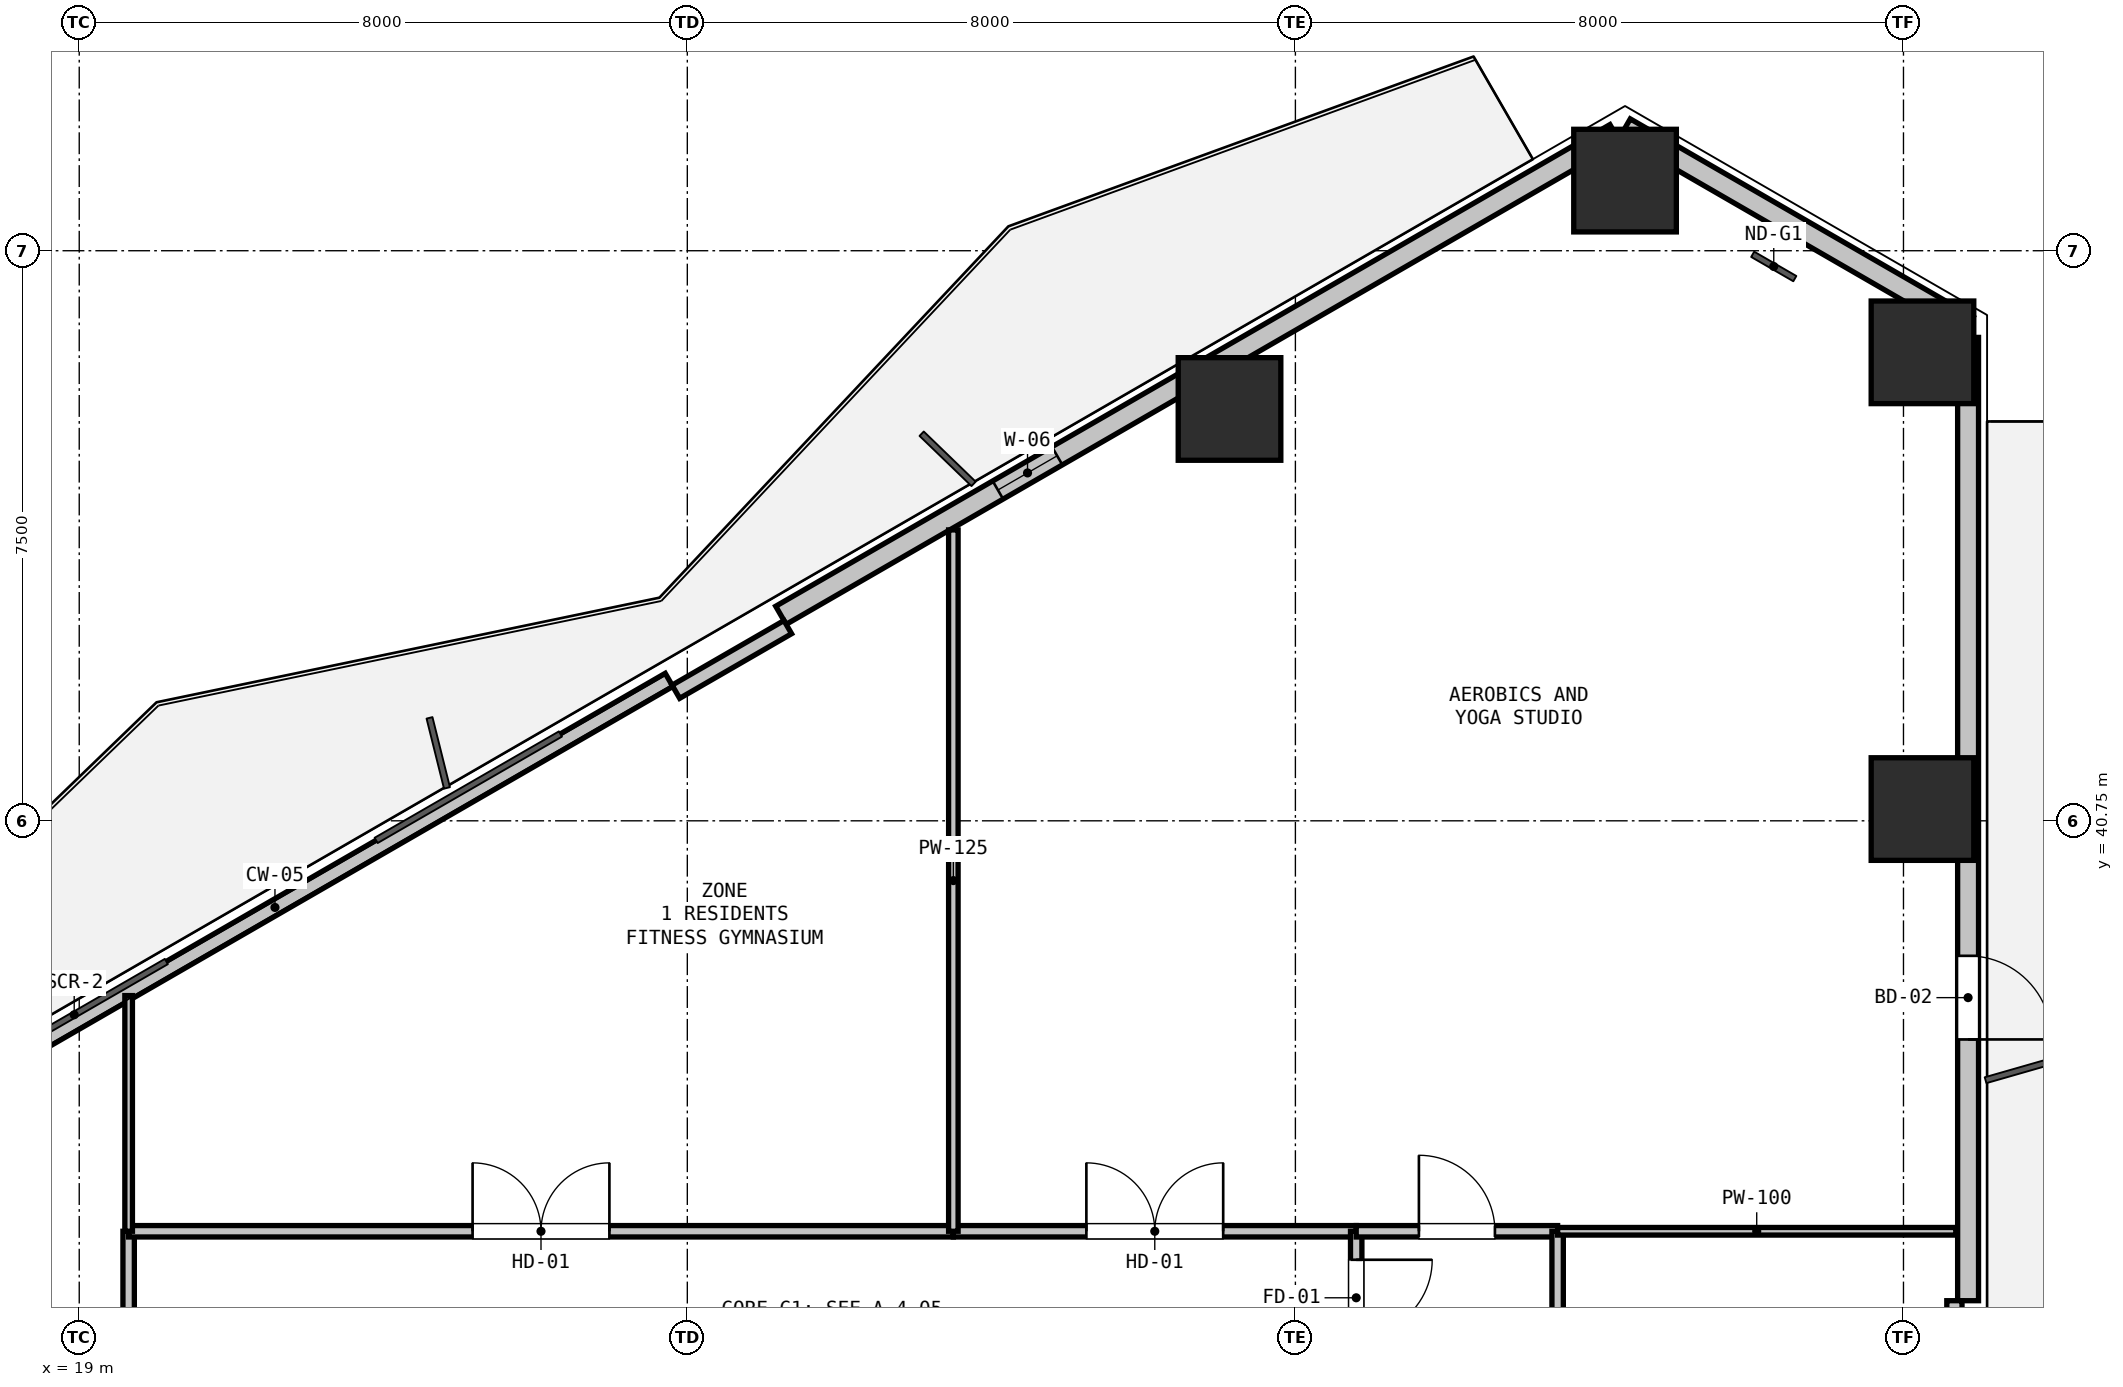
"""IFC4 building model, lengths in metres.
Left out: names, types, materials, properties, quantities, classifications, styles, units other than length and angle.
Written with IfcOpenShell. Run it as: python <this file> out.ifc"""

import sys

from ifc_helpers import new_model, si_unit, direction, frame, frame_2d, origin, origin_2d, place, context, subcontext, project, spatial, rectangle, hollow_rectangle, extrude, element, fill, save


model = new_model("IFC4")
c1 = context("Model", 3, precision=1e-05, world=origin(), true_north=direction((0.0, 1.0)))
c2 = subcontext(c1, "Body", "Model", "MODEL_VIEW")
j1 = project(units=[si_unit("LENGTHUNIT", "METRE"), si_unit("PLANEANGLEUNIT", "RADIAN")], contexts=[c1])
p1 = place(None, origin())
s1 = spatial("IfcSite", under=j1, at=p1, CompositionType="ELEMENT")
p2 = place(p1, origin())
s2 = spatial("IfcBuilding", under=s1, at=p2, CompositionType="ELEMENT")
p3 = place(p2, frame((0.0, 0.0, 62.1)))
s3 = spatial("IfcBuildingStorey", under=s2, at=p3, CompositionType="ELEMENT", Elevation=62.1)
p4 = place(p3, frame((34.133, 46.168, 0.0), z_axis=(0.0, 0.0, 1.0), x_axis=(1.0, 0.0, 0.0)))
e1 = element("IfcColumn", 1, at=p4, inside=s3, PredefinedType="COLUMN", context=c2, shape_type="SweptSolid", body=[
    extrude(hollow_rectangle(XDim=1.35, YDim=1.35, WallThickness=0.036, at=origin_2d()), origin(), (0.0, 0.0, 1.0), 3.13),
])
for number, where, z_axis, x_axis in (
    (2, (39.337, 49.173, 0.0), (0.0, 0.0, 1.0), (1.0, 0.0, 0.0)),
    (3, (43.25, 46.913, 0.0), (0.0, 0.0, 1.0), (1.0, 0.0, 0.0)),
):
    element("IfcColumn", number, at=place(p3, frame(where, z_axis=z_axis, x_axis=x_axis)), inside=s3, PredefinedType="COLUMN", context=c2, shape_type="SweptSolid", body=[
        extrude(hollow_rectangle(XDim=1.35, YDim=1.35, WallThickness=0.036, at=origin_2d()), origin(), (0.0, 0.0, 1.0), 2.88),
    ])
p5 = place(p3, frame((43.25, 40.905, 0.0), z_axis=(0.0, 0.0, 1.0), x_axis=(1.0, 0.0, 0.0)))
e4 = element("IfcColumn", 4, at=p5, inside=s3, PredefinedType="COLUMN", context=c2, shape_type="SweptSolid", body=[
    extrude(hollow_rectangle(XDim=1.35, YDim=1.35, WallThickness=0.036, at=origin_2d()), origin(), (0.0, 0.0, 1.0), 3.13),
])
p6 = place(p3, frame((39.337, 49.865, 0.0), z_axis=(0.0, 0.0, 1.0), x_axis=(0.866043601342, -0.499968479581, 0.0)))
e5 = element("IfcWall", 5, at=p6, inside=s3, PredefinedType="SOLIDWALL", context=c2, shape_type="SweptSolid", body=[
    extrude(rectangle(XDim=5.211, YDim=0.275, at=frame_2d((2.605, 0.0))), origin(), (0.0, 0.0, 1.0), 4.1),
])
p7 = place(p3, frame((16.39, 36.617, 0.0), z_axis=(0.0, 0.0, 1.0), x_axis=(0.866027351828, 0.499996625875, 0.0)))
e6 = element("IfcWall", 6, at=p7, inside=s3, PredefinedType="PARAPET", context=c2, shape_type="SweptSolid", body=[
    extrude(rectangle(XDim=11.973, YDim=0.2, at=frame_2d((5.987, 0.0))), origin(), (0.0, 0.0, 1.0), 0.2),
])
p8 = place(p3, frame((28.232, 43.454, 0.0), z_axis=(0.0, 0.0, 1.0), x_axis=(0.86603192154, 0.499988710747, 0.0)))
e7 = element("IfcWall", 7, at=p8, inside=s3, PredefinedType="SOLIDWALL", context=c2, shape_type="SweptSolid", body=[
    extrude(rectangle(XDim=12.673, YDim=0.275, at=frame_2d((6.336, 0.0))), origin(), (0.0, 0.0, 1.0), 2.865),
])
p9 = place(p8, frame((3.296, 0.0, 0.9)))
e8 = element("IfcOpeningElement", 8, at=p9, cuts=e7, PredefinedType="OPENING", context=c2, shape_type="SweptSolid", body=[
    extrude(rectangle(XDim=0.9, YDim=1.4, at=frame_2d((0.45, 0.7))), frame((0.0, 0.147, 0.0), z_axis=(0.0, -1.0, 0.0), x_axis=(1.0, 0.0, 0.0)), (0.0, 0.0, 1.0), 0.295),
])
p10 = place(p3, frame((26.85, 42.448, 0.0), z_axis=(0.0, 0.0, 1.0), x_axis=(0.86605165483, 0.499954529098, 0.0)))
e9 = element("IfcWall", 9, at=p10, inside=s3, PredefinedType="PARAPET", context=c2, shape_type="SweptSolid", body=[
    extrude(rectangle(XDim=1.7, YDim=0.2, at=frame_2d((0.85, 0.0))), origin(), (0.0, 0.0, 1.0), 4.1),
])
p11 = place(p3, frame((43.85, 47.11, 0.0), z_axis=(0.0, 0.0, 1.0), x_axis=(0.0, -1.0, 0.0)))
e10 = element("IfcWall", 10, at=p11, inside=s3, PredefinedType="SOLIDWALL", context=c2, shape_type="SweptSolid", body=[
    extrude(rectangle(XDim=12.673, YDim=0.275, at=frame_2d((6.336, 0.0))), origin(), (0.0, 0.0, 1.0), 2.865),
])
p12 = place(p11, frame((8.136, 0.0, 0.0)))
e11 = element("IfcOpeningElement", 11, at=p12, cuts=e10, PredefinedType="OPENING", context=c2, shape_type="SweptSolid", body=[
    extrude(rectangle(XDim=1.1, YDim=2.1, at=frame_2d((0.55, 1.05))), frame((0.0, 0.147, 0.0), z_axis=(0.0, -1.0, 0.0), x_axis=(1.0, 0.0, 0.0)), (0.0, 0.0, 1.0), 0.295),
])
p13 = place(p3, frame((43.67, 34.437, 0.0), z_axis=(0.0, 0.0, 1.0), x_axis=(0.0, -1.0, 0.0)))
e12 = element("IfcWall", 12, at=p13, inside=s3, PredefinedType="PARAPET", context=c2, shape_type="SweptSolid", body=[
    extrude(rectangle(XDim=1.7, YDim=0.2, at=frame_2d((0.85, 0.0))), origin(), (0.0, 0.0, 1.0), 4.1),
])
p14 = place(p3, frame((19.65, 28.5, 0.0), z_axis=(0.0, 0.0, 1.0), x_axis=(0.0, 1.0, 0.0)))
e13 = element("IfcWall", 13, at=p14, inside=s3, PredefinedType="PARTITIONING", context=c2, shape_type="SweptSolid", body=[
    extrude(rectangle(XDim=6.85, YDim=0.15, at=frame_2d((3.425, 0.0))), origin(), (0.0, 0.0, 1.0), 4.48),
])
p15 = place(p14, frame((2.925, 0.0, 0.0)))
e14 = element("IfcOpeningElement", 14, at=p15, cuts=e13, PredefinedType="OPENING", context=c2, shape_type="SweptSolid", body=[
    extrude(rectangle(XDim=1.0, YDim=2.15, at=frame_2d((0.5, 1.075))), frame((0.0, 0.085, 0.0), z_axis=(0.0, -1.0, 0.0), x_axis=(1.0, 0.0, 0.0)), (0.0, 0.0, 1.0), 0.17),
])
p16 = place(p3, frame((19.65, 35.35, 0.0), z_axis=(0.0, 0.0, 1.0), x_axis=(1.0, 0.0, 0.0)))
e15 = element("IfcWall", 15, at=p16, inside=s3, PredefinedType="PARTITIONING", context=c2, shape_type="SweptSolid", body=[
    extrude(rectangle(XDim=10.85, YDim=0.15, at=frame_2d((5.425, 0.0))), origin(), (0.0, 0.0, 1.0), 4.48),
])
p17 = place(p16, frame((4.525, 0.0, 0.0)))
e16 = element("IfcOpeningElement", 16, at=p17, cuts=e15, PredefinedType="OPENING", context=c2, shape_type="SweptSolid", body=[
    extrude(rectangle(XDim=1.8, YDim=2.2, at=frame_2d((0.9, 1.1))), frame((0.0, 0.085, 0.0), z_axis=(0.0, -1.0, 0.0), x_axis=(1.0, 0.0, 0.0)), (0.0, 0.0, 1.0), 0.17),
])
p18 = place(p3, frame((30.5, 35.35, 0.0), z_axis=(0.0, 0.0, 1.0), x_axis=(1.0, 0.0, 0.0)))
e17 = element("IfcWall", 17, at=p18, inside=s3, PredefinedType="PARTITIONING", context=c2, shape_type="SweptSolid", body=[
    extrude(rectangle(XDim=5.3, YDim=0.15, at=frame_2d((2.65, 0.0))), origin(), (0.0, 0.0, 1.0), 2.865),
])
p19 = place(p18, frame((1.75, 0.0, 0.0)))
e18 = element("IfcOpeningElement", 18, at=p19, cuts=e17, PredefinedType="OPENING", context=c2, shape_type="SweptSolid", body=[
    extrude(rectangle(XDim=1.8, YDim=2.2, at=frame_2d((0.9, 1.1))), frame((0.0, 0.085, 0.0), z_axis=(0.0, -1.0, 0.0), x_axis=(1.0, 0.0, 0.0)), (0.0, 0.0, 1.0), 0.17),
])
p20 = place(p3, frame((35.8, 35.35, 0.0), z_axis=(0.0, 0.0, 1.0), x_axis=(0.0, -1.0, 0.0)))
e19 = element("IfcWall", 19, at=p20, inside=s3, PredefinedType="PARTITIONING", context=c2, shape_type="SweptSolid", body=[
    extrude(rectangle(XDim=1.75, YDim=0.15, at=frame_2d((0.875, 0.0))), origin(), (0.0, 0.0, 1.0), 2.865),
])
p21 = place(p20, frame((0.375, 0.0, 0.0)))
e20 = element("IfcOpeningElement", 20, at=p21, cuts=e19, PredefinedType="OPENING", context=c2, shape_type="SweptSolid", body=[
    extrude(rectangle(XDim=1.0, YDim=2.15, at=frame_2d((0.5, 1.075))), frame((0.0, 0.085, 0.0), z_axis=(0.0, -1.0, 0.0), x_axis=(1.0, 0.0, 0.0)), (0.0, 0.0, 1.0), 0.17),
])
p22 = place(p3, frame((35.8, 35.35, 0.0), z_axis=(0.0, 0.0, 1.0), x_axis=(1.0, 0.0, 0.0)))
e21 = element("IfcWall", 21, at=p22, inside=s3, PredefinedType="PARTITIONING", context=c2, shape_type="SweptSolid", body=[
    extrude(rectangle(XDim=2.65, YDim=0.15, at=frame_2d((1.325, 0.0))), origin(), (0.0, 0.0, 1.0), 2.865),
])
p23 = place(p22, frame((0.825, 0.0, 0.0)))
e22 = element("IfcOpeningElement", 22, at=p23, cuts=e21, PredefinedType="OPENING", context=c2, shape_type="SweptSolid", body=[
    extrude(rectangle(XDim=1.0, YDim=2.15, at=frame_2d((0.5, 1.075))), frame((0.0, 0.085, 0.0), z_axis=(0.0, -1.0, 0.0), x_axis=(1.0, 0.0, 0.0)), (0.0, 0.0, 1.0), 0.17),
])
p24 = place(p3, frame((38.45, 35.35, 0.0), z_axis=(0.0, 0.0, 1.0), x_axis=(0.0, -1.0, 0.0)))
e23 = element("IfcWall", 23, at=p24, inside=s3, PredefinedType="PARTITIONING", context=c2, shape_type="SweptSolid", body=[
    extrude(rectangle(XDim=17.2, YDim=0.15, at=frame_2d((8.6, 0.0))), origin(), (0.0, 0.0, 1.0), 3.115),
])
p25 = place(p24, frame((8.1, 0.0, 0.0)))
e24 = element("IfcOpeningElement", 24, at=p25, cuts=e23, PredefinedType="OPENING", context=c2, shape_type="SweptSolid", body=[
    extrude(rectangle(XDim=1.0, YDim=2.15, at=frame_2d((0.5, 1.075))), frame((0.0, 0.085, 0.0), z_axis=(0.0, -1.0, 0.0), x_axis=(1.0, 0.0, 0.0)), (0.0, 0.0, 1.0), 0.17),
])
p26 = place(p3, frame((19.65, 35.35, 0.0), z_axis=(0.0, 0.0, 1.0), x_axis=(0.0, 1.0, 0.0)))
e25 = element("IfcWall", 25, at=p26, inside=s3, PredefinedType="PARTITIONING", context=c2, shape_type="SweptSolid", body=[
    extrude(rectangle(XDim=3.101, YDim=0.1, at=frame_2d((1.55, 0.0))), origin(), (0.0, 0.0, 1.0), 2.365),
])
p27 = place(p3, frame((30.5, 44.577, 0.0), z_axis=(0.0, 0.0, 1.0), x_axis=(0.0, -1.0, 0.0)))
e26 = element("IfcWall", 26, at=p27, inside=s3, PredefinedType="PARTITIONING", context=c2, shape_type="SweptSolid", body=[
    extrude(rectangle(XDim=9.227, YDim=0.125, at=frame_2d((4.613, 0.0))), origin(), (0.0, 0.0, 1.0), 2.365),
])
p28 = place(p3, frame((43.688, 35.35, 0.0), z_axis=(0.0, 0.0, 1.0), x_axis=(-1.0, 0.0, 0.0)))
e27 = element("IfcWall", 27, at=p28, inside=s3, PredefinedType="PARTITIONING", context=c2, shape_type="SweptSolid", body=[
    extrude(rectangle(XDim=5.239, YDim=0.1, at=frame_2d((2.619, 0.0))), origin(), (0.0, 0.0, 1.0), 2.365),
])
p29 = place(p9, origin())
e28 = element("IfcWindow", 28, at=p29, inside=s3, PartitioningType="SINGLE_PANEL", PredefinedType="WINDOW", context=c2, shape_type="SweptSolid", body=[
    extrude(rectangle(XDim=0.9, YDim=1.4, at=frame_2d((0.45, 0.7))), frame((0.0, 0.03, 0.0), z_axis=(0.0, -1.0, 0.0), x_axis=(1.0, 0.0, 0.0)), (0.0, 0.0, 1.0), 0.06),
])
fill(e8, e28)
p30 = place(p12, origin())
e29 = element("IfcDoor", 29, at=p30, inside=s3, OperationType="SINGLE_SWING_RIGHT", PredefinedType="DOOR", context=c2, shape_type="SweptSolid", body=[
    extrude(rectangle(XDim=1.1, YDim=2.1, at=frame_2d((0.55, 1.05))), frame((0.0, 0.025, 0.0), z_axis=(0.0, -1.0, 0.0), x_axis=(1.0, 0.0, 0.0)), (0.0, 0.0, 1.0), 0.05),
])
fill(e11, e29)
p31 = place(p21, origin())
e30 = element("IfcDoor", 30, at=p31, inside=s3, OperationType="SINGLE_SWING_LEFT", PredefinedType="DOOR", context=c2, shape_type="SweptSolid", body=[
    extrude(rectangle(XDim=1.0, YDim=2.15, at=frame_2d((0.5, 1.075))), frame((0.0, 0.025, 0.0), z_axis=(0.0, -1.0, 0.0), x_axis=(1.0, 0.0, 0.0)), (0.0, 0.0, 1.0), 0.05),
])
fill(e20, e30)
p32 = place(p17, origin())
e31 = element("IfcDoor", 31, at=p32, inside=s3, OperationType="DOUBLE_DOOR_SINGLE_SWING", PredefinedType="DOOR", context=c2, shape_type="SweptSolid", body=[
    extrude(rectangle(XDim=1.8, YDim=2.2, at=frame_2d((0.9, 1.1))), frame((0.0, 0.025, 0.0), z_axis=(0.0, -1.0, 0.0), x_axis=(1.0, 0.0, 0.0)), (0.0, 0.0, 1.0), 0.05),
])
fill(e16, e31)
p33 = place(p19, origin())
e32 = element("IfcDoor", 32, at=p33, inside=s3, OperationType="DOUBLE_DOOR_SINGLE_SWING", PredefinedType="DOOR", context=c2, shape_type="SweptSolid", body=[
    extrude(rectangle(XDim=1.8, YDim=2.2, at=frame_2d((0.9, 1.1))), frame((0.0, 0.025, 0.0), z_axis=(0.0, -1.0, 0.0), x_axis=(1.0, 0.0, 0.0)), (0.0, 0.0, 1.0), 0.05),
])
fill(e18, e32)
p34 = place(p23, origin())
e33 = element("IfcDoor", 33, at=p34, inside=s3, OperationType="SINGLE_SWING_LEFT", PredefinedType="DOOR", context=c2, shape_type="SweptSolid", body=[
    extrude(rectangle(XDim=1.0, YDim=2.15, at=frame_2d((0.5, 1.075))), frame((0.0, 0.025, 0.0), z_axis=(0.0, -1.0, 0.0), x_axis=(1.0, 0.0, 0.0)), (0.0, 0.0, 1.0), 0.05),
])
fill(e22, e33)
save(model, sys.argv[1])
